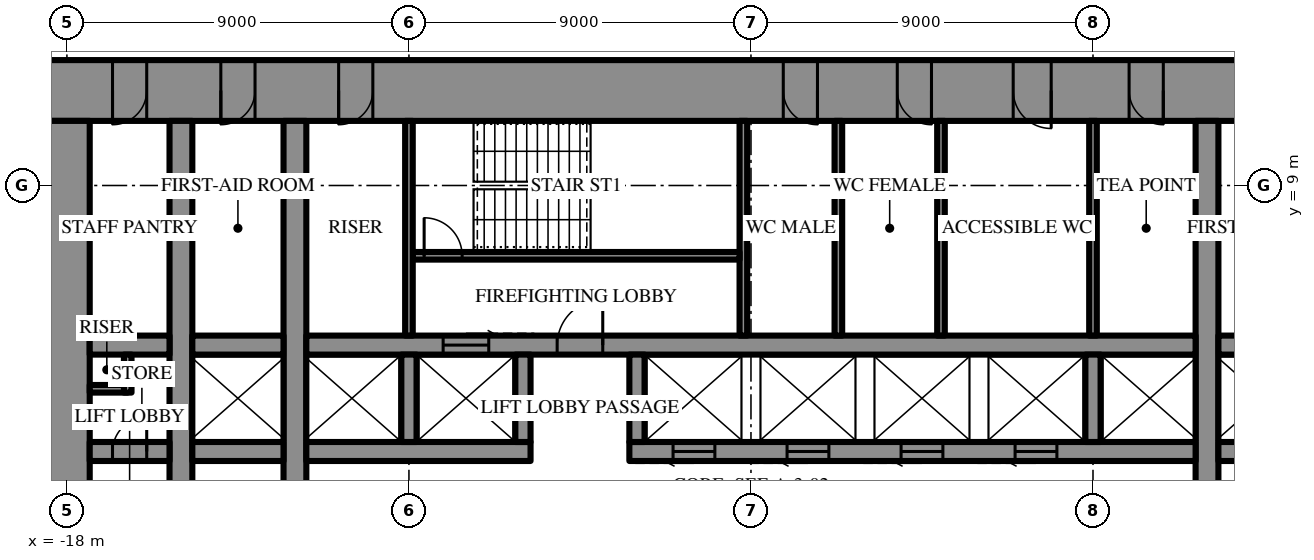
"""IFC4 building model, lengths in metres.
Left out: names, types, materials, properties, quantities, classifications, styles, units other than length and angle.
Written with IfcOpenShell. Run it as: python <this file> out.ifc"""

import sys

from ifc_helpers import new_model, si_unit, direction, frame, frame_2d, origin, place, context, subcontext, project, spatial, rectangle, extrude, element, fill, save


model = new_model("IFC4")
c1 = context("Model", 3, precision=1e-05, world=origin(), true_north=direction((0.0, 1.0)))
c2 = subcontext(c1, "Body", "Model", "MODEL_VIEW")
j1 = project(units=[si_unit("LENGTHUNIT", "METRE"), si_unit("PLANEANGLEUNIT", "RADIAN")], contexts=[c1])
p1 = place(None, origin())
s1 = spatial("IfcSite", under=j1, at=p1, CompositionType="ELEMENT")
p2 = place(p1, origin())
s2 = spatial("IfcBuilding", under=s1, at=p2, CompositionType="ELEMENT")
p3 = place(p2, frame((0.0, 0.0, 190.9)))
s3 = spatial("IfcBuildingStorey", under=s2, at=p3, CompositionType="ELEMENT", Elevation=190.9)
p4 = place(p3, frame((-18.6, 11.5, 0.0), z_axis=(0.0, 0.0, 1.0), x_axis=(1.0, 0.0, 0.0)))
e1 = element("IfcWall", 1, at=p4, inside=s3, PredefinedType="SHEAR", context=c2, shape_type="SweptSolid", body=[
    extrude(rectangle(XDim=37.2, YDim=1.6, at=frame_2d((18.6, 0.0))), origin(), (0.0, 0.0, 1.0), 4.2),
])
p5 = place(p4, frame((19.45, 0.0, 0.0)))
e2 = element("IfcOpeningElement", 2, at=p5, cuts=e1, PredefinedType="OPENING", context=c2, shape_type="SweptSolid", body=[
    extrude(rectangle(XDim=0.9, YDim=2.2, at=frame_2d((0.45, 1.1))), frame((0.0, 0.81, 0.0), z_axis=(0.0, -1.0, 0.0), x_axis=(1.0, 0.0, 0.0)), (0.0, 0.0, 1.0), 1.62),
])
p6 = place(p4, frame((22.45, 0.0, 0.0)))
e3 = element("IfcOpeningElement", 3, at=p6, cuts=e1, PredefinedType="OPENING", context=c2, shape_type="SweptSolid", body=[
    extrude(rectangle(XDim=0.9, YDim=2.2, at=frame_2d((0.45, 1.1))), frame((0.0, 0.81, 0.0), z_axis=(0.0, -1.0, 0.0), x_axis=(1.0, 0.0, 0.0)), (0.0, 0.0, 1.0), 1.62),
])
p7 = place(p4, frame((25.5, 0.0, 0.0)))
e4 = element("IfcOpeningElement", 4, at=p7, cuts=e1, PredefinedType="OPENING", context=c2, shape_type="SweptSolid", body=[
    extrude(rectangle(XDim=1.0, YDim=2.2, at=frame_2d((0.5, 1.1))), frame((0.0, 0.81, 0.0), z_axis=(0.0, -1.0, 0.0), x_axis=(1.0, 0.0, 0.0)), (0.0, 0.0, 1.0), 1.62),
])
p8 = place(p4, frame((1.8, 0.0, 0.0)))
e5 = element("IfcOpeningElement", 5, at=p8, cuts=e1, PredefinedType="OPENING", context=c2, shape_type="SweptSolid", body=[
    extrude(rectangle(XDim=0.9, YDim=2.2, at=frame_2d((0.45, 1.1))), frame((0.0, 0.81, 0.0), z_axis=(0.0, -1.0, 0.0), x_axis=(1.0, 0.0, 0.0)), (0.0, 0.0, 1.0), 1.62),
])
p9 = place(p4, frame((4.65, 0.0, 0.0)))
e6 = element("IfcOpeningElement", 6, at=p9, cuts=e1, PredefinedType="OPENING", context=c2, shape_type="SweptSolid", body=[
    extrude(rectangle(XDim=0.9, YDim=2.2, at=frame_2d((0.45, 1.1))), frame((0.0, 0.81, 0.0), z_axis=(0.0, -1.0, 0.0), x_axis=(1.0, 0.0, 0.0)), (0.0, 0.0, 1.0), 1.62),
])
p10 = place(p4, frame((7.75, 0.0, 0.0)))
e7 = element("IfcOpeningElement", 7, at=p10, cuts=e1, PredefinedType="OPENING", context=c2, shape_type="SweptSolid", body=[
    extrude(rectangle(XDim=0.9, YDim=2.2, at=frame_2d((0.45, 1.1))), frame((0.0, 0.81, 0.0), z_axis=(0.0, -1.0, 0.0), x_axis=(1.0, 0.0, 0.0)), (0.0, 0.0, 1.0), 1.62),
])
p11 = place(p4, frame((28.55, 0.0, 0.0)))
e8 = element("IfcOpeningElement", 8, at=p11, cuts=e1, PredefinedType="OPENING", context=c2, shape_type="SweptSolid", body=[
    extrude(rectangle(XDim=0.9, YDim=2.2, at=frame_2d((0.45, 1.1))), frame((0.0, 0.81, 0.0), z_axis=(0.0, -1.0, 0.0), x_axis=(1.0, 0.0, 0.0)), (0.0, 0.0, 1.0), 1.62),
])
p12 = place(p4, frame((31.65, 0.0, 0.0)))
e9 = element("IfcOpeningElement", 9, at=p12, cuts=e1, PredefinedType="OPENING", context=c2, shape_type="SweptSolid", body=[
    extrude(rectangle(XDim=0.9, YDim=2.2, at=frame_2d((0.45, 1.1))), frame((0.0, 0.81, 0.0), z_axis=(0.0, -1.0, 0.0), x_axis=(1.0, 0.0, 0.0)), (0.0, 0.0, 1.0), 1.62),
])
p13 = place(p4, frame((34.5, 0.0, 0.0)))
e10 = element("IfcOpeningElement", 10, at=p13, cuts=e1, PredefinedType="OPENING", context=c2, shape_type="SweptSolid", body=[
    extrude(rectangle(XDim=0.9, YDim=2.2, at=frame_2d((0.45, 1.1))), frame((0.0, 0.81, 0.0), z_axis=(0.0, -1.0, 0.0), x_axis=(1.0, 0.0, 0.0)), (0.0, 0.0, 1.0), 1.62),
])
p14 = place(p3, frame((-18.0, 10.7, 0.0), z_axis=(0.0, 0.0, 1.0), x_axis=(0.0, -1.0, 0.0)))
e11 = element("IfcWall", 11, at=p14, inside=s3, PredefinedType="SHEAR", context=c2, shape_type="SweptSolid", body=[
    extrude(rectangle(XDim=21.4, YDim=1.2, at=frame_2d((10.7, 0.0))), origin(), (0.0, 0.0, 1.0), 4.2),
])
p15 = place(p14, frame((9.8, 0.0, 0.0)))
e12 = element("IfcOpeningElement", 12, at=p15, cuts=e11, PredefinedType="OPENING", context=c2, shape_type="SweptSolid", body=[
    extrude(rectangle(XDim=1.8, YDim=2.4, at=frame_2d((0.9, 1.2))), frame((0.0, 0.61, 0.0), z_axis=(0.0, -1.0, 0.0), x_axis=(1.0, 0.0, 0.0)), (0.0, 0.0, 1.0), 1.22),
])
p16 = place(p3, frame((12.0, -10.7, 0.0), z_axis=(0.0, 0.0, 1.0), x_axis=(0.0, 1.0, 0.0)))
e13 = element("IfcWall", 13, at=p16, inside=s3, PredefinedType="SHEAR", context=c2, shape_type="SweptSolid", body=[
    extrude(rectangle(XDim=21.4, YDim=0.6, at=frame_2d((10.7, 0.0))), origin(), (0.0, 0.0, 1.0), 4.2),
])
p17 = place(p16, frame((9.8, 0.0, 0.0)))
e14 = element("IfcOpeningElement", 14, at=p17, cuts=e13, PredefinedType="OPENING", context=c2, shape_type="SweptSolid", body=[
    extrude(rectangle(XDim=1.8, YDim=2.4, at=frame_2d((0.9, 1.2))), frame((0.0, 0.31, 0.0), z_axis=(0.0, -1.0, 0.0), x_axis=(1.0, 0.0, 0.0)), (0.0, 0.0, 1.0), 0.62),
])
p18 = place(p3, frame((-12.0, -10.7, 0.0), z_axis=(0.0, 0.0, 1.0), x_axis=(0.0, 1.0, 0.0)))
e15 = element("IfcWall", 15, at=p18, inside=s3, PredefinedType="SHEAR", context=c2, shape_type="SweptSolid", body=[
    extrude(rectangle(XDim=21.4, YDim=0.6, at=frame_2d((10.7, 0.0))), origin(), (0.0, 0.0, 1.0), 4.2),
])
p19 = place(p18, frame((9.8, 0.0, 0.0)))
e16 = element("IfcOpeningElement", 16, at=p19, cuts=e15, PredefinedType="OPENING", context=c2, shape_type="SweptSolid", body=[
    extrude(rectangle(XDim=1.8, YDim=2.4, at=frame_2d((0.9, 1.2))), frame((0.0, 0.31, 0.0), z_axis=(0.0, -1.0, 0.0), x_axis=(1.0, 0.0, 0.0)), (0.0, 0.0, 1.0), 0.62),
])
p20 = place(p3, frame((-15.0, -10.7, 0.0), z_axis=(0.0, 0.0, 1.0), x_axis=(0.0, 1.0, 0.0)))
e17 = element("IfcWall", 17, at=p20, inside=s3, PredefinedType="SHEAR", context=c2, shape_type="SweptSolid", body=[
    extrude(rectangle(XDim=21.4, YDim=0.6, at=frame_2d((10.7, 0.0))), origin(), (0.0, 0.0, 1.0), 4.2),
])
p21 = place(p20, frame((9.8, 0.0, 0.0)))
e18 = element("IfcOpeningElement", 18, at=p21, cuts=e17, PredefinedType="OPENING", context=c2, shape_type="SweptSolid", body=[
    extrude(rectangle(XDim=1.8, YDim=2.4, at=frame_2d((0.9, 1.2))), frame((0.0, 0.31, 0.0), z_axis=(0.0, -1.0, 0.0), x_axis=(1.0, 0.0, 0.0)), (0.0, 0.0, 1.0), 0.62),
])
p22 = place(p3, frame((-17.4, 2.0, 0.0), z_axis=(0.0, 0.0, 1.0), x_axis=(1.0, 0.0, 0.0)))
e19 = element("IfcWall", 19, at=p22, inside=s3, PredefinedType="SHEAR", context=c2, shape_type="SweptSolid", body=[
    extrude(rectangle(XDim=2.1, YDim=0.5, at=frame_2d((1.05, 0.0))), origin(), (0.0, 0.0, 1.0), 4.2),
])
p23 = place(p22, frame((0.6, 0.0, 0.0)))
e20 = element("IfcOpeningElement", 20, at=p23, cuts=e19, PredefinedType="OPENING", context=c2, shape_type="SweptSolid", body=[
    extrude(rectangle(XDim=0.9, YDim=2.2, at=frame_2d((0.45, 1.1))), frame((0.0, 0.26, 0.0), z_axis=(0.0, -1.0, 0.0), x_axis=(1.0, 0.0, 0.0)), (0.0, 0.0, 1.0), 0.52),
])
p24 = place(p3, frame((-14.7, 2.0, 0.0), z_axis=(0.0, 0.0, 1.0), x_axis=(1.0, 0.0, 0.0)))
e21 = element("IfcWall", 21, at=p24, inside=s3, PredefinedType="SHEAR", context=c2, shape_type="SweptSolid", body=[
    extrude(rectangle(XDim=2.4, YDim=0.5, at=frame_2d((1.2, 0.0))), origin(), (0.0, 0.0, 1.0), 4.2),
])
p25 = place(p3, frame((-11.7, 2.0, 0.0), z_axis=(0.0, 0.0, 1.0), x_axis=(1.0, 0.0, 0.0)))
e22 = element("IfcWall", 22, at=p25, inside=s3, PredefinedType="SHEAR", context=c2, shape_type="SweptSolid", body=[
    extrude(rectangle(XDim=5.9, YDim=0.5, at=frame_2d((2.95, 0.0))), origin(), (0.0, 0.0, 1.0), 4.2),
])
p26 = place(p3, frame((-3.2, 2.0, 0.0), z_axis=(0.0, 0.0, 1.0), x_axis=(1.0, 0.0, 0.0)))
e23 = element("IfcWall", 23, at=p26, inside=s3, PredefinedType="SHEAR", context=c2, shape_type="SweptSolid", body=[
    extrude(rectangle(XDim=14.9, YDim=0.5, at=frame_2d((7.45, 0.0))), origin(), (0.0, 0.0, 1.0), 4.2),
])
p27 = place(p26, frame((1.15, 0.0, 0.0)))
e24 = element("IfcOpeningElement", 24, at=p27, cuts=e23, PredefinedType="OPENING", context=c2, shape_type="SweptSolid", body=[
    extrude(rectangle(XDim=1.1, YDim=2.2, at=frame_2d((0.55, 1.1))), frame((0.0, 0.26, 0.0), z_axis=(0.0, -1.0, 0.0), x_axis=(1.0, 0.0, 0.0)), (0.0, 0.0, 1.0), 0.52),
])
p28 = place(p26, frame((4.15, 0.0, 0.0)))
e25 = element("IfcOpeningElement", 25, at=p28, cuts=e23, PredefinedType="OPENING", context=c2, shape_type="SweptSolid", body=[
    extrude(rectangle(XDim=1.1, YDim=2.2, at=frame_2d((0.55, 1.1))), frame((0.0, 0.26, 0.0), z_axis=(0.0, -1.0, 0.0), x_axis=(1.0, 0.0, 0.0)), (0.0, 0.0, 1.0), 0.52),
])
p29 = place(p26, frame((7.15, 0.0, 0.0)))
e26 = element("IfcOpeningElement", 26, at=p29, cuts=e23, PredefinedType="OPENING", context=c2, shape_type="SweptSolid", body=[
    extrude(rectangle(XDim=1.1, YDim=2.2, at=frame_2d((0.55, 1.1))), frame((0.0, 0.26, 0.0), z_axis=(0.0, -1.0, 0.0), x_axis=(1.0, 0.0, 0.0)), (0.0, 0.0, 1.0), 0.52),
])
p30 = place(p26, frame((10.15, 0.0, 0.0)))
e27 = element("IfcOpeningElement", 27, at=p30, cuts=e23, PredefinedType="OPENING", context=c2, shape_type="SweptSolid", body=[
    extrude(rectangle(XDim=1.1, YDim=2.2, at=frame_2d((0.55, 1.1))), frame((0.0, 0.26, 0.0), z_axis=(0.0, -1.0, 0.0), x_axis=(1.0, 0.0, 0.0)), (0.0, 0.0, 1.0), 0.52),
])
p31 = place(p3, frame((12.3, 2.0, 0.0), z_axis=(0.0, 0.0, 1.0), x_axis=(1.0, 0.0, 0.0)))
e28 = element("IfcWall", 28, at=p31, inside=s3, PredefinedType="SHEAR", context=c2, shape_type="SweptSolid", body=[
    extrude(rectangle(XDim=2.4, YDim=0.5, at=frame_2d((1.2, 0.0))), origin(), (0.0, 0.0, 1.0), 4.2),
])
p32 = place(p3, frame((-17.4, 4.8, 0.0), z_axis=(0.0, 0.0, 1.0), x_axis=(1.0, 0.0, 0.0)))
e29 = element("IfcWall", 29, at=p32, inside=s3, PredefinedType="SHEAR", context=c2, shape_type="SweptSolid", body=[
    extrude(rectangle(XDim=2.1, YDim=0.5, at=frame_2d((1.05, 0.0))), origin(), (0.0, 0.0, 1.0), 4.2),
])
p33 = place(p3, frame((-14.7, 4.8, 0.0), z_axis=(0.0, 0.0, 1.0), x_axis=(1.0, 0.0, 0.0)))
e30 = element("IfcWall", 30, at=p33, inside=s3, PredefinedType="SHEAR", context=c2, shape_type="SweptSolid", body=[
    extrude(rectangle(XDim=2.4, YDim=0.5, at=frame_2d((1.2, 0.0))), origin(), (0.0, 0.0, 1.0), 4.2),
])
p34 = place(p3, frame((-11.7, 4.8, 0.0), z_axis=(0.0, 0.0, 1.0), x_axis=(1.0, 0.0, 0.0)))
e31 = element("IfcWall", 31, at=p34, inside=s3, PredefinedType="SHEAR", context=c2, shape_type="SweptSolid", body=[
    extrude(rectangle(XDim=23.4, YDim=0.5, at=frame_2d((11.7, 0.0))), origin(), (0.0, 0.0, 1.0), 4.2),
])
p35 = place(p34, frame((6.6, 0.0, 0.0)))
e32 = element("IfcOpeningElement", 32, at=p35, cuts=e31, PredefinedType="OPENING", context=c2, shape_type="SweptSolid", body=[
    extrude(rectangle(XDim=1.2, YDim=2.2, at=frame_2d((0.6, 1.1))), frame((0.0, 0.26, 0.0), z_axis=(0.0, -1.0, 0.0), x_axis=(1.0, 0.0, 0.0)), (0.0, 0.0, 1.0), 0.52),
])
p36 = place(p34, frame((3.6, 0.0, 0.0)))
e33 = element("IfcOpeningElement", 33, at=p36, cuts=e31, PredefinedType="OPENING", context=c2, shape_type="SweptSolid", body=[
    extrude(rectangle(XDim=1.2, YDim=2.2, at=frame_2d((0.6, 1.1))), frame((0.0, 0.26, 0.0), z_axis=(0.0, -1.0, 0.0), x_axis=(1.0, 0.0, 0.0)), (0.0, 0.0, 1.0), 0.52),
])
p37 = place(p3, frame((12.3, 4.8, 0.0), z_axis=(0.0, 0.0, 1.0), x_axis=(1.0, 0.0, 0.0)))
e34 = element("IfcWall", 34, at=p37, inside=s3, PredefinedType="SHEAR", context=c2, shape_type="SweptSolid", body=[
    extrude(rectangle(XDim=2.4, YDim=0.5, at=frame_2d((1.2, 0.0))), origin(), (0.0, 0.0, 1.0), 4.2),
])
for number, where, z_axis, x_axis in (
    (35, (-9.0, 2.25, 0.0), (0.0, 0.0, 1.0), (0.0, 1.0, 0.0)),
    (36, (-6.0, 2.25, 0.0), (0.0, 0.0, 1.0), (0.0, 1.0, 0.0)),
    (37, (-3.0, 2.25, 0.0), (0.0, 0.0, 1.0), (0.0, 1.0, 0.0)),
    (38, (9.0, 2.25, 0.0), (0.0, 0.0, 1.0), (0.0, 1.0, 0.0)),
):
    element("IfcWall", number, at=place(p3, frame(where, z_axis=z_axis, x_axis=x_axis)), inside=s3, PredefinedType="SHEAR", context=c2, shape_type="SweptSolid", body=[
        extrude(rectangle(XDim=2.3, YDim=0.4, at=frame_2d((1.15, 0.0))), origin(), (0.0, 0.0, 1.0), 4.2),
    ])
p38 = place(p3, frame((-0.2, 5.05, 0.0), z_axis=(0.0, 0.0, 1.0), x_axis=(0.0, 1.0, 0.0)))
e39 = element("IfcWall", 39, at=p38, inside=s3, PredefinedType="SHEAR", context=c2, shape_type="SweptSolid", body=[
    extrude(rectangle(XDim=5.65, YDim=0.2, at=frame_2d((2.825, 0.0))), origin(), (0.0, 0.0, 1.0), 4.2),
])
p39 = place(p3, frame((-8.9, 7.15, 0.0), z_axis=(0.0, 0.0, 1.0), x_axis=(1.0, 0.0, 0.0)))
e40 = element("IfcWall", 40, at=p39, inside=s3, PredefinedType="SHEAR", context=c2, shape_type="SweptSolid", body=[
    extrude(rectangle(XDim=8.6, YDim=0.2, at=frame_2d((4.3, 0.0))), origin(), (0.0, 0.0, 1.0), 4.2),
])
p40 = place(p39, frame((0.3, 0.0, 0.0)))
e41 = element("IfcOpeningElement", 41, at=p40, cuts=e40, PredefinedType="OPENING", context=c2, shape_type="SweptSolid", body=[
    extrude(rectangle(XDim=1.0, YDim=2.2, at=frame_2d((0.5, 1.1))), frame((0.0, 0.11, 0.0), z_axis=(0.0, -1.0, 0.0), x_axis=(1.0, 0.0, 0.0)), (0.0, 0.0, 1.0), 0.22),
])
for number, where, z_axis, x_axis in (
    (42, (-9.0, 5.05, 0.0), (0.0, 0.0, 1.0), (0.0, 1.0, 0.0)),
    (43, (9.0, 5.05, 0.0), (0.0, 0.0, 1.0), (0.0, 1.0, 0.0)),
    (44, (2.3, 5.05, 0.0), (0.0, 0.0, 1.0), (0.0, 1.0, 0.0)),
    (45, (5.0, 5.05, 0.0), (0.0, 0.0, 1.0), (0.0, 1.0, 0.0)),
):
    element("IfcWall", number, at=place(p3, frame(where, z_axis=z_axis, x_axis=x_axis)), inside=s3, PredefinedType="PARTITIONING", context=c2, shape_type="SweptSolid", body=[
        extrude(rectangle(XDim=5.65, YDim=0.2, at=frame_2d((2.825, 0.0))), origin(), (0.0, 0.0, 1.0), 4.0),
    ])
for number, where, z_axis, x_axis in (
    (46, (-17.4, 3.65, 0.0), (0.0, 0.0, 1.0), (1.0, 0.0, 0.0)),
    (47, (-16.4, 3.55, 0.0), (0.0, 0.0, 1.0), (0.0, 1.0, 0.0)),
):
    element("IfcWall", number, at=place(p3, frame(where, z_axis=z_axis, x_axis=x_axis)), inside=s3, PredefinedType="PARTITIONING", context=c2, shape_type="SweptSolid", body=[
        extrude(rectangle(XDim=1.0, YDim=0.2, at=frame_2d((0.5, 0.0))), origin(), (0.0, 0.0, 1.0), 4.0),
    ])
p41 = place(p35, origin())
e48 = element("IfcDoor", 48, at=p41, inside=s3, OperationType="SINGLE_SWING_LEFT", PredefinedType="DOOR", context=c2, shape_type="SweptSolid", body=[
    extrude(rectangle(XDim=1.2, YDim=2.2, at=frame_2d((0.6, 1.1))), frame((0.0, 0.025, 0.0), z_axis=(0.0, -1.0, 0.0), x_axis=(1.0, 0.0, 0.0)), (0.0, 0.0, 1.0), 0.05),
])
fill(e32, e48)
p42 = place(p40, origin())
e49 = element("IfcDoor", 49, at=p42, inside=s3, OperationType="SINGLE_SWING_RIGHT", PredefinedType="DOOR", context=c2, shape_type="SweptSolid", body=[
    extrude(rectangle(XDim=1.0, YDim=2.2, at=frame_2d((0.5, 1.1))), frame((0.0, 0.025, 0.0), z_axis=(0.0, -1.0, 0.0), x_axis=(1.0, 0.0, 0.0)), (0.0, 0.0, 1.0), 0.05),
])
fill(e41, e49)
p43 = place(p5, frame((0.9, 0.0, 0.0), z_axis=(0.0, 0.0, 1.0), x_axis=(-1.0, 0.0, 0.0)))
e50 = element("IfcDoor", 50, at=p43, inside=s3, OperationType="SINGLE_SWING_RIGHT", PredefinedType="DOOR", context=c2, shape_type="SweptSolid", body=[
    extrude(rectangle(XDim=0.9, YDim=2.2, at=frame_2d((0.45, 1.1))), frame((0.0, 0.025, 0.0), z_axis=(0.0, -1.0, 0.0), x_axis=(1.0, 0.0, 0.0)), (0.0, 0.0, 1.0), 0.05),
])
fill(e2, e50)
p44 = place(p6, frame((0.9, 0.0, 0.0), z_axis=(0.0, 0.0, 1.0), x_axis=(-1.0, 0.0, 0.0)))
e51 = element("IfcDoor", 51, at=p44, inside=s3, OperationType="SINGLE_SWING_RIGHT", PredefinedType="DOOR", context=c2, shape_type="SweptSolid", body=[
    extrude(rectangle(XDim=0.9, YDim=2.2, at=frame_2d((0.45, 1.1))), frame((0.0, 0.025, 0.0), z_axis=(0.0, -1.0, 0.0), x_axis=(1.0, 0.0, 0.0)), (0.0, 0.0, 1.0), 0.05),
])
fill(e3, e51)
p45 = place(p7, frame((1.0, 0.0, 0.0), z_axis=(0.0, 0.0, 1.0), x_axis=(-1.0, 0.0, 0.0)))
e52 = element("IfcDoor", 52, at=p45, inside=s3, OperationType="SINGLE_SWING_RIGHT", PredefinedType="DOOR", context=c2, shape_type="SweptSolid", body=[
    extrude(rectangle(XDim=1.0, YDim=2.2, at=frame_2d((0.5, 1.1))), frame((0.0, 0.025, 0.0), z_axis=(0.0, -1.0, 0.0), x_axis=(1.0, 0.0, 0.0)), (0.0, 0.0, 1.0), 0.05),
])
fill(e4, e52)
p46 = place(p8, frame((0.9, 0.0, 0.0), z_axis=(0.0, 0.0, 1.0), x_axis=(-1.0, 0.0, 0.0)))
e53 = element("IfcDoor", 53, at=p46, inside=s3, OperationType="SINGLE_SWING_LEFT", PredefinedType="DOOR", context=c2, shape_type="SweptSolid", body=[
    extrude(rectangle(XDim=0.9, YDim=2.2, at=frame_2d((0.45, 1.1))), frame((0.0, 0.025, 0.0), z_axis=(0.0, -1.0, 0.0), x_axis=(1.0, 0.0, 0.0)), (0.0, 0.0, 1.0), 0.05),
])
fill(e5, e53)
p47 = place(p9, frame((0.9, 0.0, 0.0), z_axis=(0.0, 0.0, 1.0), x_axis=(-1.0, 0.0, 0.0)))
e54 = element("IfcDoor", 54, at=p47, inside=s3, OperationType="SINGLE_SWING_LEFT", PredefinedType="DOOR", context=c2, shape_type="SweptSolid", body=[
    extrude(rectangle(XDim=0.9, YDim=2.2, at=frame_2d((0.45, 1.1))), frame((0.0, 0.025, 0.0), z_axis=(0.0, -1.0, 0.0), x_axis=(1.0, 0.0, 0.0)), (0.0, 0.0, 1.0), 0.05),
])
fill(e6, e54)
p48 = place(p10, frame((0.9, 0.0, 0.0), z_axis=(0.0, 0.0, 1.0), x_axis=(-1.0, 0.0, 0.0)))
e55 = element("IfcDoor", 55, at=p48, inside=s3, OperationType="SINGLE_SWING_LEFT", PredefinedType="DOOR", context=c2, shape_type="SweptSolid", body=[
    extrude(rectangle(XDim=0.9, YDim=2.2, at=frame_2d((0.45, 1.1))), frame((0.0, 0.025, 0.0), z_axis=(0.0, -1.0, 0.0), x_axis=(1.0, 0.0, 0.0)), (0.0, 0.0, 1.0), 0.05),
])
fill(e7, e55)
p49 = place(p11, frame((0.9, 0.0, 0.0), z_axis=(0.0, 0.0, 1.0), x_axis=(-1.0, 0.0, 0.0)))
e56 = element("IfcDoor", 56, at=p49, inside=s3, OperationType="SINGLE_SWING_RIGHT", PredefinedType="DOOR", context=c2, shape_type="SweptSolid", body=[
    extrude(rectangle(XDim=0.9, YDim=2.2, at=frame_2d((0.45, 1.1))), frame((0.0, 0.025, 0.0), z_axis=(0.0, -1.0, 0.0), x_axis=(1.0, 0.0, 0.0)), (0.0, 0.0, 1.0), 0.05),
])
fill(e8, e56)
p50 = place(p23, origin())
e57 = element("IfcDoor", 57, at=p50, inside=s3, OperationType="SINGLE_SWING_LEFT", PredefinedType="DOOR", context=c2, shape_type="SweptSolid", body=[
    extrude(rectangle(XDim=0.9, YDim=2.2, at=frame_2d((0.45, 1.1))), frame((0.0, 0.025, 0.0), z_axis=(0.0, -1.0, 0.0), x_axis=(1.0, 0.0, 0.0)), (0.0, 0.0, 1.0), 0.05),
])
fill(e20, e57)
p51 = place(p36, origin())
e58 = element("IfcDoor", 58, at=p51, inside=s3, OperationType="SLIDING_TO_LEFT", PredefinedType="DOOR", context=c2, shape_type="SweptSolid", body=[
    extrude(rectangle(XDim=1.2, YDim=2.2, at=frame_2d((0.6, 1.1))), frame((0.0, 0.025, 0.0), z_axis=(0.0, -1.0, 0.0), x_axis=(1.0, 0.0, 0.0)), (0.0, 0.0, 1.0), 0.05),
])
fill(e33, e58)
p52 = place(p27, frame((1.1, 0.0, 0.0), z_axis=(0.0, 0.0, 1.0), x_axis=(-1.0, 0.0, 0.0)))
e59 = element("IfcDoor", 59, at=p52, inside=s3, OperationType="SLIDING_TO_LEFT", PredefinedType="DOOR", context=c2, shape_type="SweptSolid", body=[
    extrude(rectangle(XDim=1.1, YDim=2.2, at=frame_2d((0.55, 1.1))), frame((0.0, 0.025, 0.0), z_axis=(0.0, -1.0, 0.0), x_axis=(1.0, 0.0, 0.0)), (0.0, 0.0, 1.0), 0.05),
])
fill(e24, e59)
p53 = place(p28, frame((1.1, 0.0, 0.0), z_axis=(0.0, 0.0, 1.0), x_axis=(-1.0, 0.0, 0.0)))
e60 = element("IfcDoor", 60, at=p53, inside=s3, OperationType="SLIDING_TO_LEFT", PredefinedType="DOOR", context=c2, shape_type="SweptSolid", body=[
    extrude(rectangle(XDim=1.1, YDim=2.2, at=frame_2d((0.55, 1.1))), frame((0.0, 0.025, 0.0), z_axis=(0.0, -1.0, 0.0), x_axis=(1.0, 0.0, 0.0)), (0.0, 0.0, 1.0), 0.05),
])
fill(e25, e60)
p54 = place(p29, frame((1.1, 0.0, 0.0), z_axis=(0.0, 0.0, 1.0), x_axis=(-1.0, 0.0, 0.0)))
e61 = element("IfcDoor", 61, at=p54, inside=s3, OperationType="SLIDING_TO_LEFT", PredefinedType="DOOR", context=c2, shape_type="SweptSolid", body=[
    extrude(rectangle(XDim=1.1, YDim=2.2, at=frame_2d((0.55, 1.1))), frame((0.0, 0.025, 0.0), z_axis=(0.0, -1.0, 0.0), x_axis=(1.0, 0.0, 0.0)), (0.0, 0.0, 1.0), 0.05),
])
fill(e26, e61)
p55 = place(p30, frame((1.1, 0.0, 0.0), z_axis=(0.0, 0.0, 1.0), x_axis=(-1.0, 0.0, 0.0)))
e62 = element("IfcDoor", 62, at=p55, inside=s3, OperationType="SLIDING_TO_LEFT", PredefinedType="DOOR", context=c2, shape_type="SweptSolid", body=[
    extrude(rectangle(XDim=1.1, YDim=2.2, at=frame_2d((0.55, 1.1))), frame((0.0, 0.025, 0.0), z_axis=(0.0, -1.0, 0.0), x_axis=(1.0, 0.0, 0.0)), (0.0, 0.0, 1.0), 0.05),
])
fill(e27, e62)
save(model, sys.argv[1])
